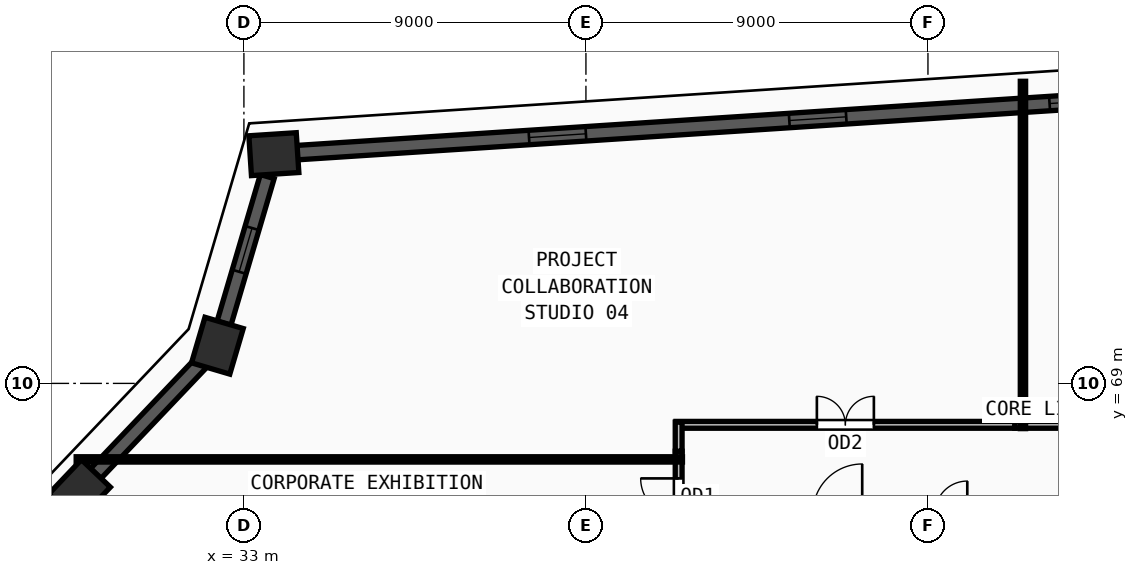
"""IFC4 building model, lengths in metres.
Left out: names, types, materials, properties, quantities, classifications, styles, units other than length and angle.
Written with IfcOpenShell. Run it as: python <this file> out.ifc"""

import sys

from ifc_helpers import new_model, si_unit, direction, frame, frame_2d, origin, origin_2d, place, context, subcontext, project, spatial, rectangle, extrude, source, transform, mapped, element, fill, save


model = new_model("IFC4")
c1 = context("Model", 3, precision=1e-05, world=origin(), true_north=direction((0.0, 1.0)))
c2 = subcontext(c1, "Body", "Model", "MODEL_VIEW")
j1 = project(units=[si_unit("LENGTHUNIT", "METRE"), si_unit("PLANEANGLEUNIT", "RADIAN")], contexts=[c1])
p1 = place(None, origin())
s1 = spatial("IfcSite", under=j1, at=p1, CompositionType="ELEMENT")
p2 = place(p1, origin())
s2 = spatial("IfcBuilding", under=s1, at=p2, CompositionType="ELEMENT")
p3 = place(p2, frame((0.0, 0.0, 270.0)))
s3 = spatial("IfcBuildingStorey", under=s2, at=p3, CompositionType="ELEMENT", Elevation=270.0)
m1 = source(origin(), c2, "Body", "SweptSolid", [
    extrude(rectangle(XDim=1.25, YDim=1.05, at=origin_2d()), origin(), (0.0, 0.0, 1.0), 3.75),
])
for number, where, z_axis, x_axis in (
    (1, (28.674, 66.179, 0.0), (0.0, 0.0, 1.0), (0.689, 0.724, 0.0)),
    (2, (32.302, 69.992, 0.0), (0.0, 0.0, 1.0), (0.283, 0.959, 0.0)),
    (3, (33.788, 75.032, 0.0), (0.0, 0.0, 1.0), (0.998, 0.065, 0.0)),
):
    element("IfcColumn", number, at=place(p3, frame(where, z_axis=z_axis, x_axis=x_axis)), inside=s3, PredefinedType="COLUMN", context=c2, shape_type="MappedRepresentation", body=[
        mapped(m1, transform((0.0, 0.0, 0.0), x_axis=(1.0, 0.0, 0.0), y_axis=(0.0, 1.0, 0.0), z_axis=(0.0, 0.0, 1.0), scale=1.0)),
    ])
p4 = place(p3, frame((61.798, 76.859, 0.0), z_axis=(0.0, 0.0, 1.0), x_axis=(-0.997879704208, -0.065085297335, 0.0)))
e4 = element("IfcWall", 4, at=p4, inside=s3, PredefinedType="SOLIDWALL", context=c2, shape_type="SweptSolid", body=[
    extrude(rectangle(XDim=27.454, YDim=0.38, at=frame_2d((13.727, 0.0))), origin(), (0.0, 0.0, 1.0), 3.57),
])
m2 = source(origin(), c2, "Body", "SweptSolid", [
    extrude(rectangle(XDim=1.5, YDim=1.9, at=frame_2d((0.75, 0.95))), frame((0.0, 0.2, 0.0), z_axis=(0.0, -1.0, 0.0), x_axis=(1.0, 0.0, 0.0)), (0.0, 0.0, 1.0), 0.4),
])
p5 = place(p4, frame((6.114, 0.0, 0.55)))
e5 = element("IfcOpeningElement", 5, at=p5, cuts=e4, PredefinedType="OPENING", context=c2, shape_type="MappedRepresentation", body=[
    mapped(m2, transform((0.0, 0.0, 0.0), x_axis=(1.0, 0.0, 0.0), y_axis=(0.0, 1.0, 0.0), z_axis=(0.0, 0.0, 1.0), scale=1.0)),
])
p6 = place(p4, frame((12.977, 0.0, 0.55)))
e6 = element("IfcOpeningElement", 6, at=p6, cuts=e4, PredefinedType="OPENING", context=c2, shape_type="MappedRepresentation", body=[
    mapped(m2, transform((0.0, 0.0, 0.0), x_axis=(1.0, 0.0, 0.0), y_axis=(0.0, 1.0, 0.0), z_axis=(0.0, 0.0, 1.0), scale=1.0)),
])
p7 = place(p4, frame((19.841, 0.0, 0.55)))
e7 = element("IfcOpeningElement", 7, at=p7, cuts=e4, PredefinedType="OPENING", context=c2, shape_type="MappedRepresentation", body=[
    mapped(m2, transform((0.0, 0.0, 0.0), x_axis=(1.0, 0.0, 0.0), y_axis=(0.0, 1.0, 0.0), z_axis=(0.0, 0.0, 1.0), scale=1.0)),
])
p8 = place(p3, frame((33.614, 74.442, 0.0), z_axis=(0.0, 0.0, 1.0), x_axis=(-0.28278049645, -0.959184648974, 0.0)))
e8 = element("IfcWall", 8, at=p8, inside=s3, PredefinedType="SOLIDWALL", context=c2, shape_type="SweptSolid", body=[
    extrude(rectangle(XDim=4.024, YDim=0.38, at=frame_2d((2.012, 0.0))), origin(), (0.0, 0.0, 1.0), 3.57),
])
m3 = source(origin(), c2, "Body", "SweptSolid", [
    extrude(rectangle(XDim=1.2, YDim=1.9, at=frame_2d((0.6, 0.95))), frame((0.0, 0.2, 0.0), z_axis=(0.0, -1.0, 0.0), x_axis=(1.0, 0.0, 0.0)), (0.0, 0.0, 1.0), 0.4),
])
p9 = place(p8, frame((1.412, 0.0, 0.55)))
e9 = element("IfcOpeningElement", 9, at=p9, cuts=e8, PredefinedType="OPENING", context=c2, shape_type="MappedRepresentation", body=[
    mapped(m3, transform((0.0, 0.0, 0.0), x_axis=(1.0, 0.0, 0.0), y_axis=(0.0, 1.0, 0.0), z_axis=(0.0, 0.0, 1.0), scale=1.0)),
])
p10 = place(p3, frame((31.878, 69.546, 0.0), z_axis=(0.0, 0.0, 1.0), x_axis=(-0.689423828673, -0.724358187955, 0.0)))
e10 = element("IfcWall", 10, at=p10, inside=s3, PredefinedType="SOLIDWALL", context=c2, shape_type="SweptSolid", body=[
    extrude(rectangle(XDim=4.032, YDim=0.38, at=frame_2d((2.016, 0.0))), origin(), (0.0, 0.0, 1.0), 3.57),
])
p11 = place(p3, frame((53.285, 67.91, 0.0), z_axis=(0.0, 0.0, 1.0), x_axis=(1.0, 0.0, 0.0)))
e11 = element("IfcWall", 11, at=p11, inside=s3, PredefinedType="PARTITIONING", context=c2, shape_type="SweptSolid", body=[
    extrude(rectangle(XDim=9.925, YDim=0.18, at=frame_2d((4.962, 0.0))), origin(), (0.0, 0.0, 1.0), 3.205),
])
m4 = source(origin(), c2, "Body", "SweptSolid", [
    extrude(rectangle(XDim=1.0, YDim=2.2, at=frame_2d((0.5, 1.1))), frame((0.0, 0.1, 0.0), z_axis=(0.0, -1.0, 0.0), x_axis=(1.0, 0.0, 0.0)), (0.0, 0.0, 1.0), 0.2),
])
p12 = place(p11, frame((4.463, 0.0, 0.0)))
e12 = element("IfcOpeningElement", 12, at=p12, cuts=e11, PredefinedType="OPENING", context=c2, shape_type="MappedRepresentation", body=[
    mapped(m4, transform((0.0, 0.0, 0.0), x_axis=(1.0, 0.0, 0.0), y_axis=(0.0, 1.0, 0.0), z_axis=(0.0, 0.0, 1.0), scale=1.0)),
])
p13 = place(p3, frame((44.37, 67.91, 0.0), z_axis=(0.0, 0.0, 1.0), x_axis=(1.0, 0.0, 0.0)))
e13 = element("IfcWall", 13, at=p13, inside=s3, PredefinedType="PARTITIONING", context=c2, shape_type="SweptSolid", body=[
    extrude(rectangle(XDim=8.915, YDim=0.18, at=frame_2d((4.458, 0.0))), origin(), (0.0, 0.0, 1.0), 3.205),
])
m5 = source(origin(), c2, "Body", "SweptSolid", [
    extrude(rectangle(XDim=1.5, YDim=2.2, at=frame_2d((0.75, 1.1))), frame((0.0, 0.1, 0.0), z_axis=(0.0, -1.0, 0.0), x_axis=(1.0, 0.0, 0.0)), (0.0, 0.0, 1.0), 0.2),
])
p14 = place(p13, frame((3.707, 0.0, 0.0)))
e14 = element("IfcOpeningElement", 14, at=p14, cuts=e13, PredefinedType="OPENING", context=c2, shape_type="MappedRepresentation", body=[
    mapped(m5, transform((0.0, 0.0, 0.0), x_axis=(1.0, 0.0, 0.0), y_axis=(0.0, 1.0, 0.0), z_axis=(0.0, 0.0, 1.0), scale=1.0)),
])
p15 = place(p3, frame((44.44, 64.785, 0.0), z_axis=(0.0, 0.0, 1.0), x_axis=(0.0, 1.0, 0.0)))
e15 = element("IfcWall", 15, at=p15, inside=s3, PredefinedType="PARTITIONING", context=c2, shape_type="SweptSolid", body=[
    extrude(rectangle(XDim=2.43, YDim=0.18, at=frame_2d((1.215, 0.0))), origin(), (0.0, 0.0, 1.0), 3.57),
])
p16 = place(p15, frame((0.715, 0.0, 0.0)))
e16 = element("IfcOpeningElement", 16, at=p16, cuts=e15, PredefinedType="OPENING", context=c2, shape_type="MappedRepresentation", body=[
    mapped(m4, transform((0.0, 0.0, 0.0), x_axis=(1.0, 0.0, 0.0), y_axis=(0.0, 1.0, 0.0), z_axis=(0.0, 0.0, 1.0), scale=1.0)),
])
p17 = place(p3, frame((44.44, 67.215, 0.0), z_axis=(0.0, 0.0, 1.0), x_axis=(0.0, 1.0, 0.0)))
e17 = element("IfcWall", 17, at=p17, inside=s3, PredefinedType="PARTITIONING", context=c2, shape_type="SweptSolid", body=[
    extrude(rectangle(XDim=0.765, YDim=0.18, at=frame_2d((0.382, 0.0))), origin(), (0.0, 0.0, 1.0), 3.57),
])
p18 = place(p3, frame((44.54, 67.0, 0.0), z_axis=(0.0, 0.0, 1.0), x_axis=(-1.0, 0.0, 0.0)))
e18 = element("IfcWall", 18, at=p18, inside=s3, PredefinedType="PARTITIONING", context=c2, shape_type="SweptSolid", body=[
    extrude(rectangle(XDim=15.954, YDim=0.14, at=frame_2d((7.977, 0.0))), origin(), (0.0, 0.0, 1.0), 3.57),
])
p19 = place(p3, frame((53.5, 67.81, 0.0), z_axis=(0.0, 0.0, 1.0), x_axis=(0.0, 1.0, 0.0)))
e19 = element("IfcWall", 19, at=p19, inside=s3, PredefinedType="PARTITIONING", context=c2, shape_type="SweptSolid", body=[
    extrude(rectangle(XDim=9.139, YDim=0.14, at=frame_2d((4.569, 0.0))), origin(), (0.0, 0.0, 1.0), 3.57),
])
m6 = source(origin(), c2, "Body", "SweptSolid", [
    extrude(rectangle(XDim=1.5, YDim=1.9, at=frame_2d((0.75, 0.95))), frame((0.0, 0.03, 0.0), z_axis=(0.0, -1.0, 0.0), x_axis=(1.0, 0.0, 0.0)), (0.0, 0.0, 1.0), 0.06),
])
p20 = place(p5, origin())
e20 = element("IfcWindow", 20, at=p20, inside=s3, PartitioningType="DOUBLE_PANEL_VERTICAL", PredefinedType="WINDOW", context=c2, shape_type="MappedRepresentation", body=[
    mapped(m6, transform((0.0, 0.0, 0.0), x_axis=(1.0, 0.0, 0.0), y_axis=(0.0, 1.0, 0.0), z_axis=(0.0, 0.0, 1.0), scale=1.0)),
])
fill(e5, e20)
p21 = place(p6, origin())
e21 = element("IfcWindow", 21, at=p21, inside=s3, PartitioningType="DOUBLE_PANEL_VERTICAL", PredefinedType="WINDOW", context=c2, shape_type="MappedRepresentation", body=[
    mapped(m6, transform((0.0, 0.0, 0.0), x_axis=(1.0, 0.0, 0.0), y_axis=(0.0, 1.0, 0.0), z_axis=(0.0, 0.0, 1.0), scale=1.0)),
])
fill(e6, e21)
p22 = place(p7, origin())
e22 = element("IfcWindow", 22, at=p22, inside=s3, PartitioningType="DOUBLE_PANEL_VERTICAL", PredefinedType="WINDOW", context=c2, shape_type="MappedRepresentation", body=[
    mapped(m6, transform((0.0, 0.0, 0.0), x_axis=(1.0, 0.0, 0.0), y_axis=(0.0, 1.0, 0.0), z_axis=(0.0, 0.0, 1.0), scale=1.0)),
])
fill(e7, e22)
m7 = source(origin(), c2, "Body", "SweptSolid", [
    extrude(rectangle(XDim=1.2, YDim=1.9, at=frame_2d((0.6, 0.95))), frame((0.0, 0.03, 0.0), z_axis=(0.0, -1.0, 0.0), x_axis=(1.0, 0.0, 0.0)), (0.0, 0.0, 1.0), 0.06),
])
p23 = place(p9, origin())
e23 = element("IfcWindow", 23, at=p23, inside=s3, PartitioningType="SINGLE_PANEL", PredefinedType="WINDOW", context=c2, shape_type="MappedRepresentation", body=[
    mapped(m7, transform((0.0, 0.0, 0.0), x_axis=(1.0, 0.0, 0.0), y_axis=(0.0, 1.0, 0.0), z_axis=(0.0, 0.0, 1.0), scale=1.0)),
])
fill(e9, e23)
m8 = source(origin(), c2, "Body", "SweptSolid", [
    extrude(rectangle(XDim=1.5, YDim=2.2, at=frame_2d((0.75, 1.1))), frame((0.0, 0.025, 0.0), z_axis=(0.0, -1.0, 0.0), x_axis=(1.0, 0.0, 0.0)), (0.0, 0.0, 1.0), 0.05),
])
p24 = place(p14, origin())
e24 = element("IfcDoor", 24, at=p24, inside=s3, OperationType="DOUBLE_DOOR_SINGLE_SWING", PredefinedType="DOOR", context=c2, shape_type="MappedRepresentation", body=[
    mapped(m8, transform((0.0, 0.0, 0.0), x_axis=(1.0, 0.0, 0.0), y_axis=(0.0, 1.0, 0.0), z_axis=(0.0, 0.0, 1.0), scale=1.0)),
])
fill(e14, e24)
m9 = source(origin(), c2, "Body", "SweptSolid", [
    extrude(rectangle(XDim=1.0, YDim=2.2, at=frame_2d((0.5, 1.1))), frame((0.0, 0.025, 0.0), z_axis=(0.0, -1.0, 0.0), x_axis=(1.0, 0.0, 0.0)), (0.0, 0.0, 1.0), 0.05),
])
p25 = place(p16, origin())
e25 = element("IfcDoor", 25, at=p25, inside=s3, OperationType="SINGLE_SWING_RIGHT", PredefinedType="DOOR", context=c2, shape_type="MappedRepresentation", body=[
    mapped(m9, transform((0.0, 0.0, 0.0), x_axis=(1.0, 0.0, 0.0), y_axis=(0.0, 1.0, 0.0), z_axis=(0.0, 0.0, 1.0), scale=1.0)),
])
fill(e16, e25)
save(model, sys.argv[1])
